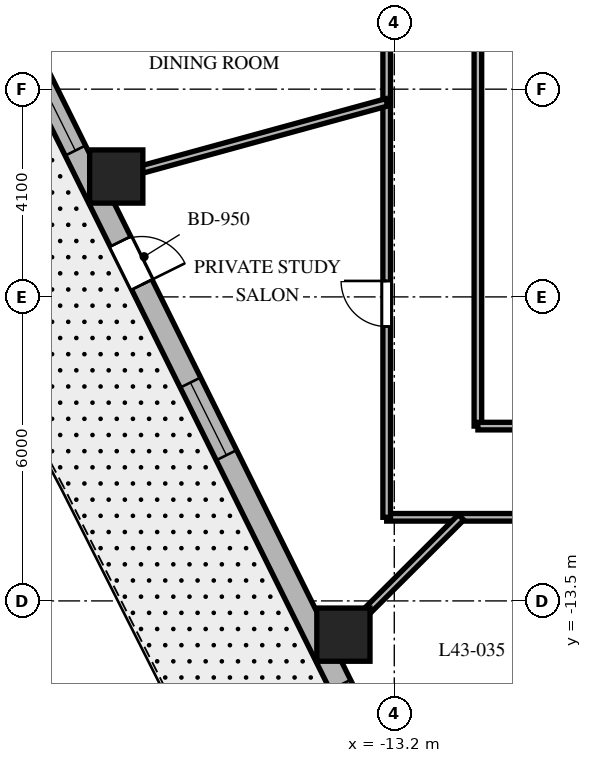
"""IFC4 building model, lengths in metres.
Left out: names, types, materials, properties, quantities, classifications, styles, units other than length and angle.
Written with IfcOpenShell. Run it as: python <this file> out.ifc"""

import sys

from ifc_helpers import new_model, si_unit, direction, frame, frame_2d, origin, origin_2d, place, context, subcontext, project, spatial, rectangle, extrude, element, fill, save


model = new_model("IFC4")
c1 = context("Model", 3, precision=1e-05, world=origin(), true_north=direction((0.0, 1.0)))
c2 = subcontext(c1, "Body", "Model", "MODEL_VIEW")
j1 = project(units=[si_unit("LENGTHUNIT", "METRE"), si_unit("PLANEANGLEUNIT", "RADIAN")], contexts=[c1])
p1 = place(None, origin())
s1 = spatial("IfcSite", under=j1, at=p1, CompositionType="ELEMENT")
p2 = place(p1, origin())
s2 = spatial("IfcBuilding", under=s1, at=p2, CompositionType="ELEMENT")
p3 = place(p2, frame((0.0, 0.0, 175.6)))
s3 = spatial("IfcBuildingStorey", under=s2, at=p3, CompositionType="ELEMENT", Elevation=175.6)
for number, where, z_axis, x_axis in (
    (1, (-18.687, -5.124, 0.0), (0.0, 0.0, 1.0), (1.0, 0.0, 0.0)),
    (2, (-14.204, -14.166, 0.0), (0.0, 0.0, 1.0), (1.0, 0.0, 0.0)),
):
    element("IfcColumn", number, at=place(p3, frame(where, z_axis=z_axis, x_axis=x_axis)), inside=s3, PredefinedType="COLUMN", context=c2, shape_type="SweptSolid", body=[
        extrude(rectangle(XDim=1.05, YDim=1.05, at=origin_2d()), origin(), (0.0, 0.0, 1.0), 3.7),
    ])
p4 = place(p3, frame((-20.618, -2.344, 0.0), z_axis=(0.0, 0.0, 1.0), x_axis=(0.444243691097, -0.895905990002, 0.0)))
e3 = element("IfcWall", 3, at=p4, inside=s3, PredefinedType="SOLIDWALL", context=c2, shape_type="SweptSolid", body=[
    extrude(rectangle(XDim=16.784, YDim=0.45, at=frame_2d((8.392, 0.0))), origin(), (0.0, 0.0, 1.0), 3.4),
])
p5 = place(p4, frame((4.535, 0.0, 0.0)))
e4 = element("IfcOpeningElement", 4, at=p5, cuts=e3, PredefinedType="OPENING", context=c2, shape_type="SweptSolid", body=[
    extrude(rectangle(XDim=0.95, YDim=2.15, at=frame_2d((0.475, 1.075))), frame((0.0, 0.235, 0.0), z_axis=(0.0, -1.0, 0.0), x_axis=(1.0, 0.0, 0.0)), (0.0, 0.0, 1.0), 0.47),
])
p6 = place(p4, frame((0.931, 0.0, 0.8)))
e5 = element("IfcOpeningElement", 5, at=p6, cuts=e3, PredefinedType="OPENING", context=c2, shape_type="SweptSolid", body=[
    extrude(rectangle(XDim=1.6, YDim=1.75, at=frame_2d((0.8, 0.875))), frame((0.0, 0.235, 0.0), z_axis=(0.0, -1.0, 0.0), x_axis=(1.0, 0.0, 0.0)), (0.0, 0.0, 1.0), 0.47),
])
p7 = place(p4, frame((7.642, 0.0, 0.8)))
e6 = element("IfcOpeningElement", 6, at=p7, cuts=e3, PredefinedType="OPENING", context=c2, shape_type="SweptSolid", body=[
    extrude(rectangle(XDim=1.6, YDim=1.75, at=frame_2d((0.8, 0.875))), frame((0.0, 0.235, 0.0), z_axis=(0.0, -1.0, 0.0), x_axis=(1.0, 0.0, 0.0)), (0.0, 0.0, 1.0), 0.47),
])
p8 = place(p4, frame((14.303, 0.0, 0.8)))
e7 = element("IfcOpeningElement", 7, at=p8, cuts=e3, PredefinedType="OPENING", context=c2, shape_type="SweptSolid", body=[
    extrude(rectangle(XDim=1.6, YDim=1.75, at=frame_2d((0.8, 0.875))), frame((0.0, 0.235, 0.0), z_axis=(0.0, -1.0, 0.0), x_axis=(1.0, 0.0, 0.0)), (0.0, 0.0, 1.0), 0.47),
])
p9 = place(p3, frame((13.35, -11.85, 0.0), z_axis=(0.0, 0.0, 1.0), x_axis=(-1.0, 0.0, 0.0)))
e8 = element("IfcWall", 8, at=p9, inside=s3, PredefinedType="PARTITIONING", context=c2, shape_type="SweptSolid", body=[
    extrude(rectangle(XDim=26.7, YDim=0.15, at=frame_2d((13.35, 0.0))), origin(), (0.0, 0.0, 1.0), 2.84),
])
p10 = place(p9, frame((22.7, 0.0, 0.0)))
e9 = element("IfcOpeningElement", 9, at=p10, cuts=e8, PredefinedType="OPENING", context=c2, shape_type="SweptSolid", body=[
    extrude(rectangle(XDim=0.9, YDim=2.03, at=frame_2d((0.45, 1.015))), frame((0.0, 0.085, 0.0), z_axis=(0.0, -1.0, 0.0), x_axis=(1.0, 0.0, 0.0)), (0.0, 0.0, 1.0), 0.17),
])
p11 = place(p9, frame((18.523, 0.0, 0.0)))
e10 = element("IfcOpeningElement", 10, at=p11, cuts=e8, PredefinedType="OPENING", context=c2, shape_type="SweptSolid", body=[
    extrude(rectangle(XDim=0.95, YDim=2.03, at=frame_2d((0.475, 1.015))), frame((0.0, 0.085, 0.0), z_axis=(0.0, -1.0, 0.0), x_axis=(1.0, 0.0, 0.0)), (0.0, 0.0, 1.0), 0.17),
])
p12 = place(p9, frame((14.469, 0.0, 0.0)))
e11 = element("IfcOpeningElement", 11, at=p12, cuts=e8, PredefinedType="OPENING", context=c2, shape_type="SweptSolid", body=[
    extrude(rectangle(XDim=0.95, YDim=2.03, at=frame_2d((0.475, 1.015))), frame((0.0, 0.085, 0.0), z_axis=(0.0, -1.0, 0.0), x_axis=(1.0, 0.0, 0.0)), (0.0, 0.0, 1.0), 0.17),
])
p13 = place(p9, frame((10.314, 0.0, 0.0)))
e12 = element("IfcOpeningElement", 12, at=p13, cuts=e8, PredefinedType="OPENING", context=c2, shape_type="SweptSolid", body=[
    extrude(rectangle(XDim=0.95, YDim=2.03, at=frame_2d((0.475, 1.015))), frame((0.0, 0.085, 0.0), z_axis=(0.0, -1.0, 0.0), x_axis=(1.0, 0.0, 0.0)), (0.0, 0.0, 1.0), 0.17),
])
p14 = place(p9, frame((3.995, 0.0, 0.0)))
e13 = element("IfcOpeningElement", 13, at=p14, cuts=e8, PredefinedType="OPENING", context=c2, shape_type="SweptSolid", body=[
    extrude(rectangle(XDim=0.95, YDim=2.03, at=frame_2d((0.475, 1.015))), frame((0.0, 0.085, 0.0), z_axis=(0.0, -1.0, 0.0), x_axis=(1.0, 0.0, 0.0)), (0.0, 0.0, 1.0), 0.17),
])
p15 = place(p3, frame((-13.35, -11.85, 0.0), z_axis=(0.0, 0.0, 1.0), x_axis=(0.0, 1.0, 0.0)))
e14 = element("IfcWall", 14, at=p15, inside=s3, PredefinedType="PARTITIONING", context=c2, shape_type="SweptSolid", body=[
    extrude(rectangle(XDim=23.7, YDim=0.15, at=frame_2d((11.85, 0.0))), origin(), (0.0, 0.0, 1.0), 2.84),
])
p16 = place(p15, frame((18.389, 0.0, 0.0)))
e15 = element("IfcOpeningElement", 15, at=p16, cuts=e14, PredefinedType="OPENING", context=c2, shape_type="SweptSolid", body=[
    extrude(rectangle(XDim=0.95, YDim=2.03, at=frame_2d((0.475, 1.015))), frame((0.0, 0.085, 0.0), z_axis=(0.0, -1.0, 0.0), x_axis=(1.0, 0.0, 0.0)), (0.0, 0.0, 1.0), 0.17),
])
p17 = place(p15, frame((12.315, 0.0, 0.0)))
e16 = element("IfcOpeningElement", 16, at=p17, cuts=e14, PredefinedType="OPENING", context=c2, shape_type="SweptSolid", body=[
    extrude(rectangle(XDim=0.9, YDim=2.03, at=frame_2d((0.45, 1.015))), frame((0.0, 0.085, 0.0), z_axis=(0.0, -1.0, 0.0), x_axis=(1.0, 0.0, 0.0)), (0.0, 0.0, 1.0), 0.17),
])
p18 = place(p15, frame((9.27, 0.0, 0.0)))
e17 = element("IfcOpeningElement", 17, at=p18, cuts=e14, PredefinedType="OPENING", context=c2, shape_type="SweptSolid", body=[
    extrude(rectangle(XDim=0.9, YDim=2.03, at=frame_2d((0.45, 1.015))), frame((0.0, 0.085, 0.0), z_axis=(0.0, -1.0, 0.0), x_axis=(1.0, 0.0, 0.0)), (0.0, 0.0, 1.0), 0.17),
])
p19 = place(p15, frame((3.765, 0.0, 0.0)))
e18 = element("IfcOpeningElement", 18, at=p19, cuts=e14, PredefinedType="OPENING", context=c2, shape_type="SweptSolid", body=[
    extrude(rectangle(XDim=0.9, YDim=2.03, at=frame_2d((0.45, 1.015))), frame((0.0, 0.085, 0.0), z_axis=(0.0, -1.0, 0.0), x_axis=(1.0, 0.0, 0.0)), (0.0, 0.0, 1.0), 0.17),
])
p20 = place(p3, frame((-11.55, 2.7, 0.0), z_axis=(0.0, 0.0, 1.0), x_axis=(0.0, -1.0, 0.0)))
e19 = element("IfcWall", 19, at=p20, inside=s3, PredefinedType="PARTITIONING", context=c2, shape_type="SweptSolid", body=[
    extrude(rectangle(XDim=12.75, YDim=0.15, at=frame_2d((6.375, 0.0))), origin(), (0.0, 0.0, 1.0), 2.84),
])
p21 = place(p3, frame((-11.55, -10.05, 0.0), z_axis=(0.0, 0.0, 1.0), x_axis=(1.0, 0.0, 0.0)))
e20 = element("IfcWall", 20, at=p21, inside=s3, PredefinedType="PARTITIONING", context=c2, shape_type="SweptSolid", body=[
    extrude(rectangle(XDim=11.55, YDim=0.15, at=frame_2d((5.775, 0.0))), origin(), (0.0, 0.0, 1.0), 2.84),
])
p22 = place(p3, frame((-13.35, -3.661, 0.0), z_axis=(0.0, 0.0, 1.0), x_axis=(-0.964397145454, -0.264458211898, 0.0)))
e21 = element("IfcWall", 21, at=p22, inside=s3, PredefinedType="PARTITIONING", context=c2, shape_type="SweptSolid", body=[
    extrude(rectangle(XDim=6.039, YDim=0.15, at=frame_2d((3.019, 0.0))), origin(), (0.0, 0.0, 1.0), 2.64),
])
p23 = place(p3, frame((-11.882, -11.85, 0.0), z_axis=(0.0, 0.0, 1.0), x_axis=(-0.708037373639, -0.706174962407, 0.0)))
e22 = element("IfcWall", 22, at=p23, inside=s3, PredefinedType="PARTITIONING", context=c2, shape_type="SweptSolid", body=[
    extrude(rectangle(XDim=3.802, YDim=0.15, at=frame_2d((1.901, 0.0))), origin(), (0.0, 0.0, 1.0), 2.64),
])
p24 = place(p3, frame((-7.619, -11.85, 0.0), z_axis=(0.0, 0.0, 1.0), x_axis=(-0.540829263478, -0.841132396098, 0.0)))
e23 = element("IfcWall", 23, at=p24, inside=s3, PredefinedType="PARTITIONING", context=c2, shape_type="SweptSolid", body=[
    extrude(rectangle(XDim=7.919, YDim=0.15, at=frame_2d((3.959, 0.0))), origin(), (0.0, 0.0, 1.0), 2.64),
])
p25 = place(p5, origin())
e24 = element("IfcDoor", 24, at=p25, inside=s3, OperationType="SINGLE_SWING_RIGHT", PredefinedType="DOOR", context=c2, shape_type="SweptSolid", body=[
    extrude(rectangle(XDim=0.95, YDim=2.15, at=frame_2d((0.475, 1.075))), frame((0.0, 0.025, 0.0), z_axis=(0.0, -1.0, 0.0), x_axis=(1.0, 0.0, 0.0)), (0.0, 0.0, 1.0), 0.05),
])
fill(e4, e24)
p26 = place(p6, origin())
e25 = element("IfcWindow", 25, at=p26, inside=s3, PartitioningType="SINGLE_PANEL", PredefinedType="WINDOW", context=c2, shape_type="SweptSolid", body=[
    extrude(rectangle(XDim=1.6, YDim=1.75, at=frame_2d((0.8, 0.875))), frame((0.0, 0.03, 0.0), z_axis=(0.0, -1.0, 0.0), x_axis=(1.0, 0.0, 0.0)), (0.0, 0.0, 1.0), 0.06),
])
fill(e5, e25)
p27 = place(p7, origin())
e26 = element("IfcWindow", 26, at=p27, inside=s3, PartitioningType="SINGLE_PANEL", PredefinedType="WINDOW", context=c2, shape_type="SweptSolid", body=[
    extrude(rectangle(XDim=1.6, YDim=1.75, at=frame_2d((0.8, 0.875))), frame((0.0, 0.03, 0.0), z_axis=(0.0, -1.0, 0.0), x_axis=(1.0, 0.0, 0.0)), (0.0, 0.0, 1.0), 0.06),
])
fill(e6, e26)
p28 = place(p19, origin())
e27 = element("IfcDoor", 27, at=p28, inside=s3, OperationType="SINGLE_SWING_RIGHT", PredefinedType="DOOR", context=c2, shape_type="SweptSolid", body=[
    extrude(rectangle(XDim=0.9, YDim=2.03, at=frame_2d((0.45, 1.015))), frame((0.0, 0.025, 0.0), z_axis=(0.0, -1.0, 0.0), x_axis=(1.0, 0.0, 0.0)), (0.0, 0.0, 1.0), 0.05),
])
fill(e18, e27)
save(model, sys.argv[1])
